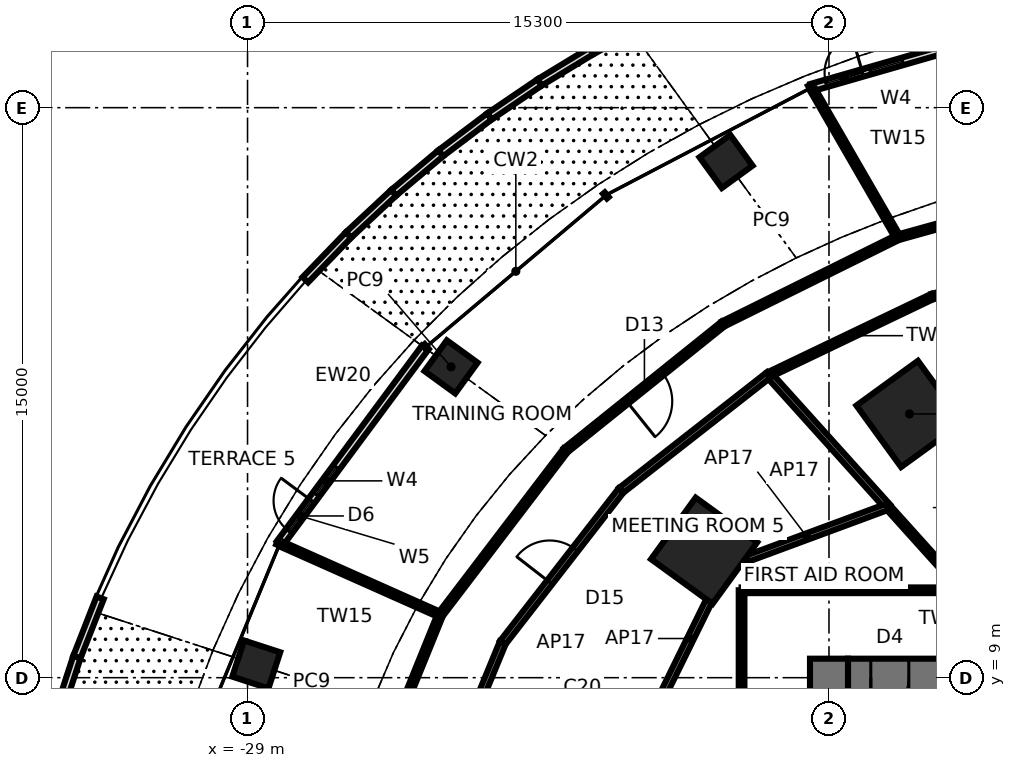
"""IFC4 building model, lengths in metres.
Left out: names, types, materials, properties, quantities, classifications, styles, units other than length and angle.
Written with IfcOpenShell. Run it as: python <this file> out.ifc"""

import sys

from ifc_helpers import new_model, si_unit, direction, frame, frame_2d, origin, origin_2d, place, context, subcontext, project, spatial, rectangle, extrude, element, fill, save


model = new_model("IFC4")
c1 = context("Model", 3, precision=1e-05, world=origin(), true_north=direction((0.0, 1.0)))
c2 = subcontext(c1, "Body", "Model", "MODEL_VIEW")
j1 = project(units=[si_unit("LENGTHUNIT", "METRE"), si_unit("PLANEANGLEUNIT", "RADIAN")], contexts=[c1])
p1 = place(None, origin())
s1 = spatial("IfcSite", under=j1, at=p1, CompositionType="ELEMENT")
p2 = place(p1, origin())
s2 = spatial("IfcBuilding", under=s1, at=p2, CompositionType="ELEMENT")
p3 = place(p2, frame((0.0, 0.0, 15.1)))
s3 = spatial("IfcBuildingStorey", under=s2, at=p3, CompositionType="ELEMENT", Elevation=15.1)
for number, where, z_axis, x_axis in (
    (1, (-11.581, 15.94, 0.0), (0.0, 0.0, 1.0), (-0.588, 0.809, 0.0)),
    (2, (-16.986, 12.341, 0.0), (0.0, 0.0, 1.0), (-0.809, 0.588, 0.0)),
):
    element("IfcColumn", number, at=place(p3, frame(where, z_axis=z_axis, x_axis=x_axis)), inside=s3, PredefinedType="COLUMN", context=c2, shape_type="SweptSolid", body=[
        extrude(rectangle(XDim=2.0, YDim=2.0, at=origin_2d()), origin(), (0.0, 0.0, 1.0), 4.5),
    ])
for number, where, z_axis, x_axis in (
    (3, (-16.409, 22.584, 0.0), (0.0, 0.0, 1.0), (-0.588, 0.809, 0.0)),
    (4, (-23.645, 17.179, 0.0), (0.0, 0.0, 1.0), (-0.809, 0.588, 0.0)),
    (5, (-28.77, 9.348, 0.0), (0.0, 0.0, 1.0), (-0.951, 0.309, 0.0)),
):
    element("IfcColumn", number, at=place(p3, frame(where, z_axis=z_axis, x_axis=x_axis)), inside=s3, PredefinedType="COLUMN", context=c2, shape_type="SweptSolid", body=[
        extrude(rectangle(XDim=1.0, YDim=1.0, at=origin_2d()), origin(), (0.0, 0.0, 1.0), 4.5),
    ])
p4 = place(p3, frame((13.2, 9.0, 0.0), z_axis=(0.0, 0.0, 1.0), x_axis=(-1.0, 0.0, 0.0)))
e6 = element("IfcWall", 6, at=p4, inside=s3, PredefinedType="SHEAR", context=c2, shape_type="SweptSolid", body=[
    extrude(rectangle(XDim=26.4, YDim=1.0, at=frame_2d((13.2, 0.0))), origin(), (0.0, 0.0, 1.0), 4.5),
])
p5 = place(p4, frame((2.65, 0.0, 0.0)))
e7 = element("IfcOpeningElement", 7, at=p5, cuts=e6, PredefinedType="OPENING", context=c2, shape_type="SweptSolid", body=[
    extrude(rectangle(XDim=0.9, YDim=2.1, at=frame_2d((0.45, 1.05))), frame((0.0, 0.51, 0.0), z_axis=(0.0, -1.0, 0.0), x_axis=(1.0, 0.0, 0.0)), (0.0, 0.0, 1.0), 1.02),
])
p6 = place(p4, frame((9.5, 0.0, 0.0)))
e8 = element("IfcOpeningElement", 8, at=p6, cuts=e6, PredefinedType="OPENING", context=c2, shape_type="SweptSolid", body=[
    extrude(rectangle(XDim=0.9, YDim=2.1, at=frame_2d((0.45, 1.05))), frame((0.0, 0.51, 0.0), z_axis=(0.0, -1.0, 0.0), x_axis=(1.0, 0.0, 0.0)), (0.0, 0.0, 1.0), 1.02),
])
p7 = place(p4, frame((16.0, 0.0, 0.0)))
e9 = element("IfcOpeningElement", 9, at=p7, cuts=e6, PredefinedType="OPENING", context=c2, shape_type="SweptSolid", body=[
    extrude(rectangle(XDim=0.9, YDim=2.1, at=frame_2d((0.45, 1.05))), frame((0.0, 0.51, 0.0), z_axis=(0.0, -1.0, 0.0), x_axis=(1.0, 0.0, 0.0)), (0.0, 0.0, 1.0), 1.02),
])
p8 = place(p4, frame((21.25, 0.0, 0.0)))
e10 = element("IfcOpeningElement", 10, at=p8, cuts=e6, PredefinedType="OPENING", context=c2, shape_type="SweptSolid", body=[
    extrude(rectangle(XDim=0.9, YDim=2.1, at=frame_2d((0.45, 1.05))), frame((0.0, 0.51, 0.0), z_axis=(0.0, -1.0, 0.0), x_axis=(1.0, 0.0, 0.0)), (0.0, 0.0, 1.0), 1.02),
])
p9 = place(p4, frame((24.8, 0.0, 0.0)))
e11 = element("IfcOpeningElement", 11, at=p9, cuts=e6, PredefinedType="OPENING", context=c2, shape_type="SweptSolid", body=[
    extrude(rectangle(XDim=1.0, YDim=2.1, at=frame_2d((0.5, 1.05))), frame((0.0, 0.51, 0.0), z_axis=(0.0, -1.0, 0.0), x_axis=(1.0, 0.0, 0.0)), (0.0, 0.0, 1.0), 1.02),
])
p10 = place(p3, frame((-13.7, 9.5, 0.0), z_axis=(0.0, 0.0, 1.0), x_axis=(0.0, -1.0, 0.0)))
e12 = element("IfcWall", 12, at=p10, inside=s3, PredefinedType="SHEAR", context=c2, shape_type="SweptSolid", body=[
    extrude(rectangle(XDim=19.0, YDim=1.0, at=frame_2d((9.5, 0.0))), origin(), (0.0, 0.0, 1.0), 4.5),
])
p11 = place(p10, frame((8.6, 0.0, 0.0)))
e13 = element("IfcOpeningElement", 13, at=p11, cuts=e12, PredefinedType="OPENING", context=c2, shape_type="SweptSolid", body=[
    extrude(rectangle(XDim=1.8, YDim=2.4, at=frame_2d((0.9, 1.2))), frame((0.0, 0.51, 0.0), z_axis=(0.0, -1.0, 0.0), x_axis=(1.0, 0.0, 0.0)), (0.0, 0.0, 1.0), 1.02),
])
p12 = place(p3, frame((-8.499, 26.156, 0.0), z_axis=(0.0, 0.0, 1.0), x_axis=(-0.961086494425, -0.276247624847, 0.0)))
e14 = element("IfcWall", 14, at=p12, inside=s3, PredefinedType="SOLIDWALL", context=c2, shape_type="SweptSolid", body=[
    extrude(rectangle(XDim=5.892, YDim=0.2, at=frame_2d((2.946, 0.0))), origin(), (0.0, 0.0, 1.0), 4.3),
])
p13 = place(p12, frame((4.492, 0.0, 0.0)))
e15 = element("IfcOpeningElement", 15, at=p13, cuts=e14, PredefinedType="OPENING", context=c2, shape_type="SweptSolid", body=[
    extrude(rectangle(XDim=1.0, YDim=2.4, at=frame_2d((0.5, 1.2))), frame((0.0, 0.11, 0.0), z_axis=(0.0, -1.0, 0.0), x_axis=(1.0, 0.0, 0.0)), (0.0, 0.0, 1.0), 0.22),
])
p14 = place(p12, frame((3.392, 0.0, 0.3)))
e16 = element("IfcOpeningElement", 16, at=p14, cuts=e14, PredefinedType="OPENING", context=c2, shape_type="SweptSolid", body=[
    extrude(rectangle(XDim=0.9, YDim=2.1, at=frame_2d((0.45, 1.05))), frame((0.0, 0.11, 0.0), z_axis=(0.0, -1.0, 0.0), x_axis=(1.0, 0.0, 0.0)), (0.0, 0.0, 1.0), 0.22),
])
p15 = place(p12, frame((4.492, 0.0, 2.7)))
e17 = element("IfcOpeningElement", 17, at=p15, cuts=e14, PredefinedType="OPENING", context=c2, shape_type="SweptSolid", body=[
    extrude(rectangle(XDim=1.0, YDim=0.6, at=frame_2d((0.5, 0.3))), frame((0.0, 0.11, 0.0), z_axis=(0.0, -1.0, 0.0), x_axis=(1.0, 0.0, 0.0)), (0.0, 0.0, 1.0), 0.22),
])
p16 = place(p3, frame((-24.332, 17.678, 0.0), z_axis=(0.0, 0.0, 1.0), x_axis=(-0.595729578383, -0.803185077949, 0.0)))
e18 = element("IfcWall", 18, at=p16, inside=s3, PredefinedType="SOLIDWALL", context=c2, shape_type="SweptSolid", body=[
    extrude(rectangle(XDim=6.407, YDim=0.2, at=frame_2d((3.203, 0.0))), origin(), (0.0, 0.0, 1.0), 4.3),
])
p17 = place(p16, frame((5.007, 0.0, 0.0)))
e19 = element("IfcOpeningElement", 19, at=p17, cuts=e18, PredefinedType="OPENING", context=c2, shape_type="SweptSolid", body=[
    extrude(rectangle(XDim=1.0, YDim=2.4, at=frame_2d((0.5, 1.2))), frame((0.0, 0.11, 0.0), z_axis=(0.0, -1.0, 0.0), x_axis=(1.0, 0.0, 0.0)), (0.0, 0.0, 1.0), 0.22),
])
p18 = place(p16, frame((3.907, 0.0, 0.3)))
e20 = element("IfcOpeningElement", 20, at=p18, cuts=e18, PredefinedType="OPENING", context=c2, shape_type="SweptSolid", body=[
    extrude(rectangle(XDim=0.9, YDim=2.1, at=frame_2d((0.45, 1.05))), frame((0.0, 0.11, 0.0), z_axis=(0.0, -1.0, 0.0), x_axis=(1.0, 0.0, 0.0)), (0.0, 0.0, 1.0), 0.22),
])
p19 = place(p16, frame((5.007, 0.0, 2.7)))
e21 = element("IfcOpeningElement", 21, at=p19, cuts=e18, PredefinedType="OPENING", context=c2, shape_type="SweptSolid", body=[
    extrude(rectangle(XDim=1.0, YDim=0.6, at=frame_2d((0.5, 0.3))), frame((0.0, 0.11, 0.0), z_axis=(0.0, -1.0, 0.0), x_axis=(1.0, 0.0, 0.0)), (0.0, 0.0, 1.0), 0.22),
])
p20 = place(p3, frame((-18.572, 26.239, 0.0), z_axis=(0.0, 0.0, 1.0), x_axis=(-0.879254107283, -0.476353035916, 0.0)))
e22 = element("IfcWall", 22, at=p20, inside=s3, PredefinedType="PARAPET", context=c2, shape_type="SweptSolid", body=[
    extrude(rectangle(XDim=1.575, YDim=0.2, at=frame_2d((0.788, 0.0))), origin(), (0.0, 0.0, 1.0), 1.1),
])
p21 = place(p3, frame((-19.957, 25.489, 0.0), z_axis=(0.0, 0.0, 1.0), x_axis=(-0.854614346543, -0.519263246036, 0.0)))
e23 = element("IfcWall", 23, at=p21, inside=s3, PredefinedType="PARAPET", context=c2, shape_type="SweptSolid", body=[
    extrude(rectangle(XDim=1.586, YDim=0.2, at=frame_2d((0.793, 0.0))), origin(), (0.0, 0.0, 1.0), 1.1),
])
p22 = place(p3, frame((-21.313, 24.665, 0.0), z_axis=(0.0, 0.0, 1.0), x_axis=(-0.827554410772, -0.561385515676, 0.0)))
e24 = element("IfcWall", 24, at=p22, inside=s3, PredefinedType="PARAPET", context=c2, shape_type="SweptSolid", body=[
    extrude(rectangle(XDim=1.597, YDim=0.2, at=frame_2d((0.798, 0.0))), origin(), (0.0, 0.0, 1.0), 1.1),
])
p23 = place(p3, frame((-22.635, 23.768, 0.0), z_axis=(0.0, 0.0, 1.0), x_axis=(-0.79788031401, -0.602815896038, 0.0)))
e25 = element("IfcWall", 25, at=p23, inside=s3, PredefinedType="PARAPET", context=c2, shape_type="SweptSolid", body=[
    extrude(rectangle(XDim=1.607, YDim=0.2, at=frame_2d((0.803, 0.0))), origin(), (0.0, 0.0, 1.0), 1.1),
])
p24 = place(p3, frame((-23.917, 22.8, 0.0), z_axis=(0.0, 0.0, 1.0), x_axis=(-0.765603731978, -0.643312463412, 0.0)))
e26 = element("IfcWall", 26, at=p24, inside=s3, PredefinedType="PARAPET", context=c2, shape_type="SweptSolid", body=[
    extrude(rectangle(XDim=1.617, YDim=0.2, at=frame_2d((0.809, 0.0))), origin(), (0.0, 0.0, 1.0), 1.1),
])
p25 = place(p3, frame((-25.155, 21.759, 0.0), z_axis=(0.0, 0.0, 1.0), x_axis=(-0.730930479444, -0.682451928138, 0.0)))
e27 = element("IfcWall", 27, at=p25, inside=s3, PredefinedType="PARAPET", context=c2, shape_type="SweptSolid", body=[
    extrude(rectangle(XDim=1.627, YDim=0.2, at=frame_2d((0.813, 0.0))), origin(), (0.0, 0.0, 1.0), 1.1),
])
p26 = place(p3, frame((-26.344, 20.649, 0.0), z_axis=(0.0, 0.0, 1.0), x_axis=(-0.693699046619, -0.720264973964, 0.0)))
e28 = element("IfcWall", 28, at=p26, inside=s3, PredefinedType="PARAPET", context=c2, shape_type="SweptSolid", body=[
    extrude(rectangle(XDim=1.636, YDim=0.2, at=frame_2d((0.818, 0.0))), origin(), (0.0, 0.0, 1.0), 1.1),
])
p27 = place(p3, frame((-32.878, 11.102, 0.0), z_axis=(0.0, 0.0, 1.0), x_axis=(-0.365386733402, -0.930855807875, 0.0)))
e29 = element("IfcWall", 29, at=p27, inside=s3, PredefinedType="PARAPET", context=c2, shape_type="SweptSolid", body=[
    extrude(rectangle(XDim=1.678, YDim=0.2, at=frame_2d((0.839, 0.0))), origin(), (0.0, 0.0, 1.0), 1.1),
])
p28 = place(p3, frame((-33.491, 9.54, 0.0), z_axis=(0.0, 0.0, 1.0), x_axis=(-0.310342888438, -0.950624684929, 0.0)))
e30 = element("IfcWall", 30, at=p28, inside=s3, PredefinedType="PARAPET", context=c2, shape_type="SweptSolid", body=[
    extrude(rectangle(XDim=1.682, YDim=0.2, at=frame_2d((0.841, 0.0))), origin(), (0.0, 0.0, 1.0), 1.1),
])
p29 = place(p3, frame((6.524, 11.3, 0.0), z_axis=(0.0, 0.0, 1.0), x_axis=(-1.0, 0.0, 0.0)))
e31 = element("IfcWall", 31, at=p29, inside=s3, PredefinedType="PARTITIONING", context=c2, shape_type="SweptSolid", body=[
    extrude(rectangle(XDim=22.524, YDim=0.15, at=frame_2d((11.262, 0.0))), origin(), (0.0, 0.0, 1.0), 4.3),
])
p30 = place(p29, frame((10.393, 0.0, 0.0)))
e32 = element("IfcOpeningElement", 32, at=p30, cuts=e31, PredefinedType="OPENING", context=c2, shape_type="SweptSolid", body=[
    extrude(rectangle(XDim=1.2, YDim=2.4, at=frame_2d((0.6, 1.2))), frame((0.0, 0.085, 0.0), z_axis=(0.0, -1.0, 0.0), x_axis=(1.0, 0.0, 0.0)), (0.0, 0.0, 1.0), 0.17),
])
p31 = place(p29, frame((2.068, 0.0, 0.0)))
e33 = element("IfcOpeningElement", 33, at=p31, cuts=e31, PredefinedType="OPENING", context=c2, shape_type="SweptSolid", body=[
    extrude(rectangle(XDim=1.2, YDim=2.4, at=frame_2d((0.6, 1.2))), frame((0.0, 0.085, 0.0), z_axis=(0.0, -1.0, 0.0), x_axis=(1.0, 0.0, 0.0)), (0.0, 0.0, 1.0), 0.17),
])
p32 = place(p3, frame((-7.12, 21.913, 0.0), z_axis=(0.0, 0.0, 1.0), x_axis=(-0.963396906427, -0.268079094089, 0.0)))
e34 = element("IfcWall", 34, at=p32, inside=s3, PredefinedType="PARTITIONING", context=c2, shape_type="SweptSolid", body=[
    extrude(rectangle(XDim=4.947, YDim=0.15, at=frame_2d((2.474, 0.0))), origin(), (0.0, 0.0, 1.0), 4.3),
])
p33 = place(p32, frame((1.873, 0.0, 0.0)))
e35 = element("IfcOpeningElement", 35, at=p33, cuts=e34, PredefinedType="OPENING", context=c2, shape_type="SweptSolid", body=[
    extrude(rectangle(XDim=1.2, YDim=2.4, at=frame_2d((0.6, 1.2))), frame((0.0, 0.085, 0.0), z_axis=(0.0, -1.0, 0.0), x_axis=(1.0, 0.0, 0.0)), (0.0, 0.0, 1.0), 0.17),
])
p34 = place(p3, frame((-10.986, 19.028, 0.0), z_axis=(0.0, 0.0, 1.0), x_axis=(0.966581260218, 0.256360424783, 0.0)))
e36 = element("IfcWall", 36, at=p34, inside=s3, PredefinedType="PARTITIONING", context=c2, shape_type="SweptSolid", body=[
    extrude(rectangle(XDim=4.575, YDim=0.15, at=frame_2d((2.288, 0.0))), origin(), (0.0, 0.0, 1.0), 4.3),
])
p35 = place(p3, frame((-11.886, 20.587, 0.0), z_axis=(0.0, 0.0, 1.0), x_axis=(-0.499968249168, 0.86604373436, 0.0)))
e37 = element("IfcWall", 37, at=p35, inside=s3, PredefinedType="PARTITIONING", context=c2, shape_type="SweptSolid", body=[
    extrude(rectangle(XDim=4.471, YDim=0.15, at=frame_2d((2.235, 0.0))), origin(), (0.0, 0.0, 1.0), 4.3),
])
p36 = place(p3, frame((-11.886, 20.587, 0.0), z_axis=(0.0, 0.0, 1.0), x_axis=(-0.896161272218, -0.443728491509, 0.0)))
e38 = element("IfcWall", 38, at=p36, inside=s3, PredefinedType="PARTITIONING", context=c2, shape_type="SweptSolid", body=[
    extrude(rectangle(XDim=5.133, YDim=0.15, at=frame_2d((2.566, 0.0))), origin(), (0.0, 0.0, 1.0), 4.3),
])
p37 = place(p3, frame((-15.281, 16.972, 0.0), z_axis=(0.0, 0.0, 1.0), x_axis=(0.901954568833, 0.431830934234, 0.0)))
e39 = element("IfcWall", 39, at=p37, inside=s3, PredefinedType="PARTITIONING", context=c2, shape_type="SweptSolid", body=[
    extrude(rectangle(XDim=4.763, YDim=0.15, at=frame_2d((2.381, 0.0))), origin(), (0.0, 0.0, 1.0), 4.3),
])
p38 = place(p3, frame((-12.156, 13.5, 0.0), z_axis=(0.0, 0.0, 1.0), x_axis=(-0.669135077133, 0.74314079995, 0.0)))
e40 = element("IfcWall", 40, at=p38, inside=s3, PredefinedType="PARTITIONING", context=c2, shape_type="SweptSolid", body=[
    extrude(rectangle(XDim=4.671, YDim=0.17, at=frame_2d((2.336, 0.0))), origin(), (0.0, 0.0, 1.0), 4.3),
])
p39 = place(p3, frame((-10.175, 11.3, 0.0), z_axis=(0.0, 0.0, 1.0), x_axis=(-0.669156051145, 0.7431219141, 0.0)))
e41 = element("IfcWall", 41, at=p39, inside=s3, PredefinedType="PARTITIONING", context=c2, shape_type="SweptSolid", body=[
    extrude(rectangle(XDim=2.961, YDim=0.15, at=frame_2d((1.48, 0.0))), origin(), (0.0, 0.0, 1.0), 4.3),
])
p40 = place(p3, frame((-16.486, 18.309, 0.0), z_axis=(0.0, 0.0, 1.0), x_axis=(-0.779898885774, -0.625905526393, 0.0)))
e42 = element("IfcWall", 42, at=p40, inside=s3, PredefinedType="PARTITIONING", context=c2, shape_type="SweptSolid", body=[
    extrude(rectangle(XDim=5.31, YDim=0.15, at=frame_2d((2.655, 0.0))), origin(), (0.0, 0.0, 1.0), 4.3),
])
p41 = place(p40, frame((2.055, 0.0, 0.0)))
e43 = element("IfcOpeningElement", 43, at=p41, cuts=e42, PredefinedType="OPENING", context=c2, shape_type="SweptSolid", body=[
    extrude(rectangle(XDim=1.2, YDim=2.4, at=frame_2d((0.6, 1.2))), frame((0.0, 0.085, 0.0), z_axis=(0.0, -1.0, 0.0), x_axis=(1.0, 0.0, 0.0)), (0.0, 0.0, 1.0), 0.17),
])
p42 = place(p3, frame((-19.17, 13.928, 0.0), z_axis=(0.0, 0.0, 1.0), x_axis=(0.787485179354, 0.616333588487, 0.0)))
e44 = element("IfcWall", 44, at=p42, inside=s3, PredefinedType="PARTITIONING", context=c2, shape_type="SweptSolid", body=[
    extrude(rectangle(XDim=4.938, YDim=0.17, at=frame_2d((2.469, 0.0))), origin(), (0.0, 0.0, 1.0), 4.3),
])
p43 = place(p3, frame((-16.413, 11.925, 0.0), z_axis=(0.0, 0.0, 1.0), x_axis=(0.937814922048, 0.34713566798, 0.0)))
e45 = element("IfcWall", 45, at=p43, inside=s3, PredefinedType="PARTITIONING", context=c2, shape_type="SweptSolid", body=[
    extrude(rectangle(XDim=4.539, YDim=0.17, at=frame_2d((2.27, 0.0))), origin(), (0.0, 0.0, 1.0), 4.3),
])
p44 = place(p3, frame((-18.276, 8.137, 0.0), z_axis=(0.0, 0.0, 1.0), x_axis=(0.44142043443, 0.897300395669, 0.0)))
e46 = element("IfcWall", 46, at=p44, inside=s3, PredefinedType="PARTITIONING", context=c2, shape_type="SweptSolid", body=[
    extrude(rectangle(XDim=4.221, YDim=0.17, at=frame_2d((2.111, 0.0))), origin(), (0.0, 0.0, 1.0), 4.3),
])
p45 = place(p3, frame((-20.627, 14.986, 0.0), z_axis=(0.0, 0.0, 1.0), x_axis=(-0.606135035954, -0.795361753034, 0.0)))
e47 = element("IfcWall", 47, at=p45, inside=s3, PredefinedType="PARTITIONING", context=c2, shape_type="SweptSolid", body=[
    extrude(rectangle(XDim=5.447, YDim=0.15, at=frame_2d((2.724, 0.0))), origin(), (0.0, 0.0, 1.0), 4.3),
])
p46 = place(p3, frame((-22.284, 9.921, 0.0), z_axis=(0.0, 0.0, 1.0), x_axis=(0.613607456707, 0.789611226537, 0.0)))
e48 = element("IfcWall", 48, at=p46, inside=s3, PredefinedType="PARTITIONING", context=c2, shape_type="SweptSolid", body=[
    extrude(rectangle(XDim=5.074, YDim=0.17, at=frame_2d((2.537, 0.0))), origin(), (0.0, 0.0, 1.0), 4.3),
])
p47 = place(p46, frame((2.012, 0.0, 0.0)))
e49 = element("IfcOpeningElement", 49, at=p47, cuts=e48, PredefinedType="OPENING", context=c2, shape_type="SweptSolid", body=[
    extrude(rectangle(XDim=1.1, YDim=2.4, at=frame_2d((0.55, 1.2))), frame((0.0, 0.095, 0.0), z_axis=(0.0, -1.0, 0.0), x_axis=(1.0, 0.0, 0.0)), (0.0, 0.0, 1.0), 0.19),
])
p48 = place(p3, frame((-16.0, 11.3, 0.0), z_axis=(0.0, 0.0, 1.0), x_axis=(0.0, -1.0, 0.0)))
e50 = element("IfcWall", 50, at=p48, inside=s3, PredefinedType="PARTITIONING", context=c2, shape_type="SweptSolid", body=[
    extrude(rectangle(XDim=6.979, YDim=0.15, at=frame_2d((3.49, 0.0))), origin(), (0.0, 0.0, 1.0), 4.3),
])
p49 = place(p48, frame((2.915, 0.0, 0.0)))
e51 = element("IfcOpeningElement", 51, at=p49, cuts=e50, PredefinedType="OPENING", context=c2, shape_type="SweptSolid", body=[
    extrude(rectangle(XDim=1.2, YDim=2.4, at=frame_2d((0.6, 1.2))), frame((0.0, 0.085, 0.0), z_axis=(0.0, -1.0, 0.0), x_axis=(1.0, 0.0, 0.0)), (0.0, 0.0, 1.0), 0.17),
])
p50 = place(p3, frame((-23.928, 10.654, 0.0), z_axis=(0.0, 0.0, 1.0), x_axis=(-0.913547449471, 0.406732169326, 0.0)))
e52 = element("IfcWall", 52, at=p50, inside=s3, PredefinedType="PARTITIONING", context=c2, shape_type="SweptSolid", body=[
    extrude(rectangle(XDim=4.54, YDim=0.15, at=frame_2d((2.27, 0.0))), origin(), (0.0, 0.0, 1.0), 4.3),
])
p51 = place(p3, frame((-23.9, 6.0, 0.0), z_axis=(0.0, 0.0, 1.0), x_axis=(0.381027738685, 0.92456360644, 0.0)))
e53 = element("IfcWall", 53, at=p51, inside=s3, PredefinedType="PARTITIONING", context=c2, shape_type="SweptSolid", body=[
    extrude(rectangle(XDim=4.241, YDim=0.17, at=frame_2d((2.121, 0.0))), origin(), (0.0, 0.0, 1.0), 4.3),
])
p52 = place(p3, frame((-23.928, 10.654, 0.0), z_axis=(0.0, 0.0, 1.0), x_axis=(-0.376134336796, -0.92656514109, 0.0)))
e54 = element("IfcWall", 54, at=p52, inside=s3, PredefinedType="PARTITIONING", context=c2, shape_type="SweptSolid", body=[
    extrude(rectangle(XDim=5.531, YDim=0.15, at=frame_2d((2.766, 0.0))), origin(), (0.0, 0.0, 1.0), 4.3),
])
p53 = place(p13, frame((1.0, 0.0, 0.0), z_axis=(0.0, 0.0, 1.0), x_axis=(-1.0, 0.0, 0.0)))
e55 = element("IfcDoor", 55, at=p53, inside=s3, OperationType="SINGLE_SWING_RIGHT", PredefinedType="DOOR", context=c2, shape_type="SweptSolid", body=[
    extrude(rectangle(XDim=1.0, YDim=2.4, at=frame_2d((0.5, 1.2))), frame((0.0, 0.025, 0.0), z_axis=(0.0, -1.0, 0.0), x_axis=(1.0, 0.0, 0.0)), (0.0, 0.0, 1.0), 0.05),
])
fill(e15, e55)
p54 = place(p14, origin())
e56 = element("IfcWindow", 56, at=p54, inside=s3, PartitioningType="SINGLE_PANEL", PredefinedType="WINDOW", context=c2, shape_type="SweptSolid", body=[
    extrude(rectangle(XDim=0.9, YDim=2.1, at=frame_2d((0.45, 1.05))), frame((0.0, 0.03, 0.0), z_axis=(0.0, -1.0, 0.0), x_axis=(1.0, 0.0, 0.0)), (0.0, 0.0, 1.0), 0.06),
])
fill(e16, e56)
p55 = place(p15, origin())
e57 = element("IfcWindow", 57, at=p55, inside=s3, PartitioningType="SINGLE_PANEL", PredefinedType="WINDOW", context=c2, shape_type="SweptSolid", body=[
    extrude(rectangle(XDim=1.0, YDim=0.6, at=frame_2d((0.5, 0.3))), frame((0.0, 0.03, 0.0), z_axis=(0.0, -1.0, 0.0), x_axis=(1.0, 0.0, 0.0)), (0.0, 0.0, 1.0), 0.06),
])
fill(e17, e57)
p56 = place(p17, frame((1.0, 0.0, 0.0), z_axis=(0.0, 0.0, 1.0), x_axis=(-1.0, 0.0, 0.0)))
e58 = element("IfcDoor", 58, at=p56, inside=s3, OperationType="SINGLE_SWING_RIGHT", PredefinedType="DOOR", context=c2, shape_type="SweptSolid", body=[
    extrude(rectangle(XDim=1.0, YDim=2.4, at=frame_2d((0.5, 1.2))), frame((0.0, 0.025, 0.0), z_axis=(0.0, -1.0, 0.0), x_axis=(1.0, 0.0, 0.0)), (0.0, 0.0, 1.0), 0.05),
])
fill(e19, e58)
p57 = place(p18, origin())
e59 = element("IfcWindow", 59, at=p57, inside=s3, PartitioningType="SINGLE_PANEL", PredefinedType="WINDOW", context=c2, shape_type="SweptSolid", body=[
    extrude(rectangle(XDim=0.9, YDim=2.1, at=frame_2d((0.45, 1.05))), frame((0.0, 0.03, 0.0), z_axis=(0.0, -1.0, 0.0), x_axis=(1.0, 0.0, 0.0)), (0.0, 0.0, 1.0), 0.06),
])
fill(e20, e59)
p58 = place(p19, origin())
e60 = element("IfcWindow", 60, at=p58, inside=s3, PartitioningType="SINGLE_PANEL", PredefinedType="WINDOW", context=c2, shape_type="SweptSolid", body=[
    extrude(rectangle(XDim=1.0, YDim=0.6, at=frame_2d((0.5, 0.3))), frame((0.0, 0.03, 0.0), z_axis=(0.0, -1.0, 0.0), x_axis=(1.0, 0.0, 0.0)), (0.0, 0.0, 1.0), 0.06),
])
fill(e21, e60)
p59 = place(p9, origin())
e61 = element("IfcDoor", 61, at=p59, inside=s3, OperationType="SINGLE_SWING_RIGHT", PredefinedType="DOOR", context=c2, shape_type="SweptSolid", body=[
    extrude(rectangle(XDim=0.92, YDim=2.06, at=frame_2d((0.5, 1.03))), frame((0.0, 0.025, 0.0), z_axis=(0.0, -1.0, 0.0), x_axis=(1.0, 0.0, 0.0)), (0.0, 0.0, 1.0), 0.05),
    extrude(rectangle(XDim=0.04, YDim=2.1, at=frame_2d((0.02, 1.05))), frame((0.0, 0.25, 0.0), z_axis=(0.0, -1.0, 0.0), x_axis=(1.0, 0.0, 0.0)), (0.0, 0.0, 1.0), 0.5),
    extrude(rectangle(XDim=0.04, YDim=2.1, at=frame_2d((0.98, 1.05))), frame((0.0, 0.25, 0.0), z_axis=(0.0, -1.0, 0.0), x_axis=(1.0, 0.0, 0.0)), (0.0, 0.0, 1.0), 0.5),
    extrude(rectangle(XDim=0.92, YDim=0.04, at=frame_2d((0.5, 2.08))), frame((0.0, 0.25, 0.0), z_axis=(0.0, -1.0, 0.0), x_axis=(1.0, 0.0, 0.0)), (0.0, 0.0, 1.0), 0.5),
])
fill(e11, e61)
p60 = place(p47, origin())
e62 = element("IfcDoor", 62, at=p60, inside=s3, OperationType="SINGLE_SWING_LEFT", PredefinedType="DOOR", context=c2, shape_type="SweptSolid", body=[
    extrude(rectangle(XDim=1.1, YDim=2.4, at=frame_2d((0.55, 1.2))), frame((0.0, 0.025, 0.0), z_axis=(0.0, -1.0, 0.0), x_axis=(1.0, 0.0, 0.0)), (0.0, 0.0, 1.0), 0.05),
])
fill(e49, e62)
p61 = place(p41, origin())
e63 = element("IfcDoor", 63, at=p61, inside=s3, OperationType="SINGLE_SWING_RIGHT", PredefinedType="DOOR", context=c2, shape_type="SweptSolid", body=[
    extrude(rectangle(XDim=1.2, YDim=2.4, at=frame_2d((0.6, 1.2))), frame((0.0, 0.025, 0.0), z_axis=(0.0, -1.0, 0.0), x_axis=(1.0, 0.0, 0.0)), (0.0, 0.0, 1.0), 0.05),
])
fill(e43, e63)
save(model, sys.argv[1])
